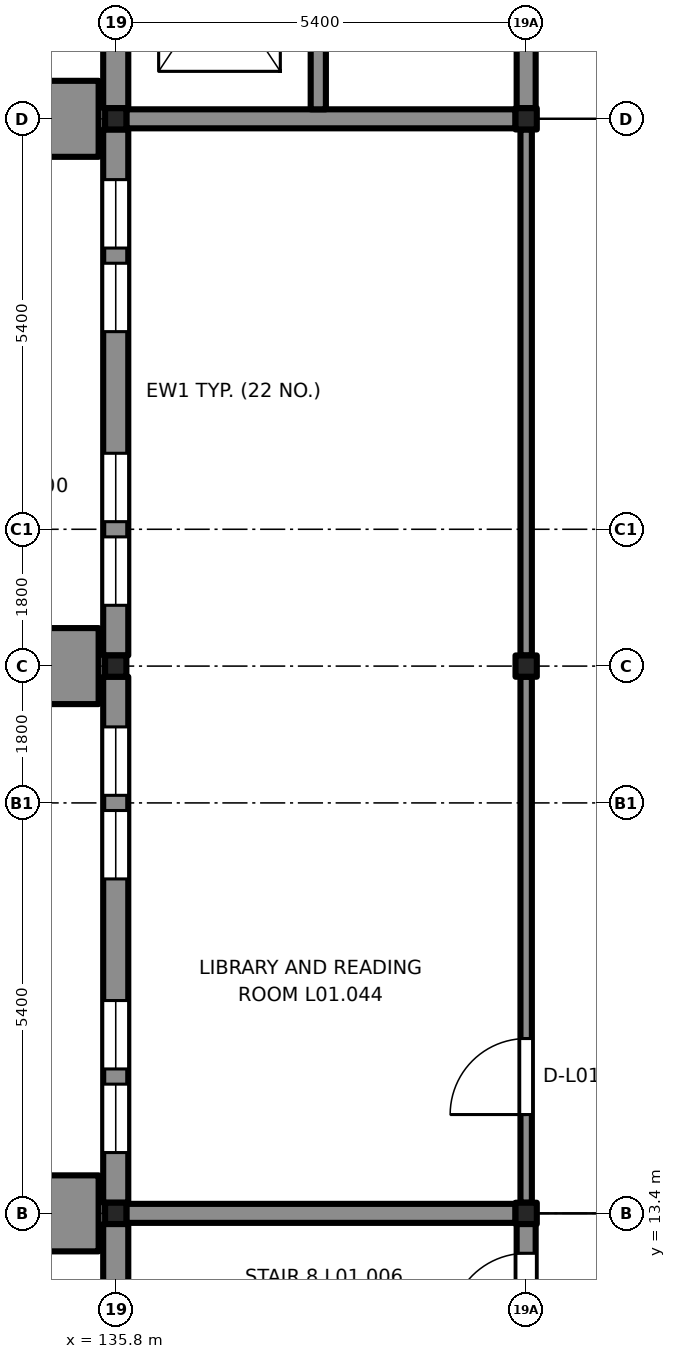
"""IFC4 building model, lengths in metres.
Left out: names, types, materials, properties, quantities, classifications, styles, units other than length and angle.
Written with IfcOpenShell. Run it as: python <this file> out.ifc"""

import sys

from ifc_helpers import new_model, si_unit, direction, frame, frame_2d, origin, origin_2d, place, context, subcontext, project, spatial, rectangle, extrude, element, fill, save


model = new_model("IFC4")
c1 = context("Model", 3, precision=1e-05, world=origin(), true_north=direction((0.0, 1.0)))
c2 = subcontext(c1, "Body", "Model", "MODEL_VIEW")
j1 = project(units=[si_unit("LENGTHUNIT", "METRE"), si_unit("PLANEANGLEUNIT", "RADIAN")], contexts=[c1])
p1 = place(None, origin())
s1 = spatial("IfcSite", under=j1, at=p1, CompositionType="ELEMENT")
p2 = place(p1, origin())
s2 = spatial("IfcBuilding", under=s1, at=p2, CompositionType="ELEMENT")
p3 = place(p2, frame((0.0, 0.0, 6.3)))
s3 = spatial("IfcBuildingStorey", under=s2, at=p3, CompositionType="ELEMENT", Elevation=6.3)
for number, where, z_axis, x_axis in (
    (1, (135.8, 13.4, 0.0), (0.0, 0.0, 1.0), (1.0, 0.0, 0.0)),
    (2, (141.2, 13.4, 0.0), (0.0, 0.0, 1.0), (1.0, 0.0, 0.0)),
    (3, (135.8, 20.6, 0.0), (0.0, 0.0, 1.0), (1.0, 0.0, 0.0)),
    (4, (141.2, 20.6, 0.0), (0.0, 0.0, 1.0), (1.0, 0.0, 0.0)),
    (5, (135.8, 27.8, 0.0), (0.0, 0.0, 1.0), (1.0, 0.0, 0.0)),
    (6, (141.2, 27.8, 0.0), (0.0, 0.0, 1.0), (1.0, 0.0, 0.0)),
):
    element("IfcColumn", number, at=place(p3, frame(where, z_axis=z_axis, x_axis=x_axis)), inside=s3, PredefinedType="COLUMN", context=c2, shape_type="SweptSolid", body=[
        extrude(rectangle(XDim=0.28, YDim=0.28, at=origin_2d()), origin(), (0.0, 0.0, 1.0), 3.9),
    ])
p4 = place(p3, frame((141.2, 6.365, 0.0), z_axis=(0.0, 0.0, 1.0), x_axis=(0.0, 1.0, 0.0)))
e7 = element("IfcWall", 7, at=p4, inside=s3, PredefinedType="SHEAR", context=c2, shape_type="SweptSolid", body=[
    extrude(rectangle(XDim=6.895, YDim=0.25, at=frame_2d((3.448, 0.0))), origin(), (0.0, 0.0, 1.0), 3.65),
])
p5 = place(p4, frame((5.51, 0.0, 0.0)))
e8 = element("IfcOpeningElement", 8, at=p5, cuts=e7, PredefinedType="OPENING", context=c2, shape_type="SweptSolid", body=[
    extrude(rectangle(XDim=1.0, YDim=2.1, at=frame_2d((0.5, 1.05))), frame((0.0, 0.135, 0.0), z_axis=(0.0, -1.0, 0.0), x_axis=(1.0, 0.0, 0.0)), (0.0, 0.0, 1.0), 0.27),
])
p6 = place(p3, frame((135.94, 13.4, 0.0), z_axis=(0.0, 0.0, 1.0), x_axis=(1.0, 0.0, 0.0)))
e9 = element("IfcWall", 9, at=p6, inside=s3, PredefinedType="SHEAR", context=c2, shape_type="SweptSolid", body=[
    extrude(rectangle(XDim=5.12, YDim=0.25, at=frame_2d((2.56, 0.0))), origin(), (0.0, 0.0, 1.0), 3.65),
])
p7 = place(p3, frame((141.2, 27.94, 0.0), z_axis=(0.0, 0.0, 1.0), x_axis=(0.0, 1.0, 0.0)))
e10 = element("IfcWall", 10, at=p7, inside=s3, PredefinedType="SHEAR", context=c2, shape_type="SweptSolid", body=[
    extrude(rectangle(XDim=6.92, YDim=0.25, at=frame_2d((3.46, 0.0))), origin(), (0.0, 0.0, 1.0), 3.65),
])
p8 = place(p7, frame((4.16, 0.0, 0.0)))
e11 = element("IfcOpeningElement", 11, at=p8, cuts=e10, PredefinedType="OPENING", context=c2, shape_type="SweptSolid", body=[
    extrude(rectangle(XDim=1.8, YDim=2.1, at=frame_2d((0.9, 1.05))), frame((0.0, 0.135, 0.0), z_axis=(0.0, -1.0, 0.0), x_axis=(1.0, 0.0, 0.0)), (0.0, 0.0, 1.0), 0.27),
])
p9 = place(p3, frame((135.94, 27.8, 0.0), z_axis=(0.0, 0.0, 1.0), x_axis=(1.0, 0.0, 0.0)))
e12 = element("IfcWall", 12, at=p9, inside=s3, PredefinedType="SHEAR", context=c2, shape_type="SweptSolid", body=[
    extrude(rectangle(XDim=5.12, YDim=0.25, at=frame_2d((2.56, 0.0))), origin(), (0.0, 0.0, 1.0), 3.65),
])
p10 = place(p3, frame((138.465, 27.925, 0.0), z_axis=(0.0, 0.0, 1.0), x_axis=(0.0, 1.0, 0.0)))
e13 = element("IfcWall", 13, at=p10, inside=s3, PredefinedType="SHEAR", context=c2, shape_type="SweptSolid", body=[
    extrude(rectangle(XDim=3.0, YDim=0.2, at=frame_2d((1.5, 0.0))), origin(), (0.0, 0.0, 1.0), 3.65),
])
p11 = place(p3, frame((135.8, 10.5, 0.0), z_axis=(0.0, 0.0, 1.0), x_axis=(0.0, 1.0, 0.0)))
e14 = element("IfcWall", 14, at=p11, inside=s3, PredefinedType="SOLIDWALL", context=c2, shape_type="SweptSolid", body=[
    extrude(rectangle(XDim=2.76, YDim=0.33, at=frame_2d((1.38, 0.0))), origin(), (0.0, 0.0, 1.0), 3.22),
])
p12 = place(p3, frame((135.8, 13.54, 0.0), z_axis=(0.0, 0.0, 1.0), x_axis=(0.0, 1.0, 0.0)))
e15 = element("IfcWall", 15, at=p12, inside=s3, PredefinedType="SOLIDWALL", context=c2, shape_type="SweptSolid", body=[
    extrude(rectangle(XDim=6.92, YDim=0.33, at=frame_2d((3.46, 0.0))), origin(), (0.0, 0.0, 1.0), 3.22),
])
p13 = place(p12, frame((0.66, 0.0, 0.6)))
e16 = element("IfcOpeningElement", 16, at=p13, cuts=e15, PredefinedType="OPENING", context=c2, shape_type="SweptSolid", body=[
    extrude(rectangle(XDim=0.9, YDim=2.4, at=frame_2d((0.45, 1.2))), frame((0.0, 0.175, 0.0), z_axis=(0.0, -1.0, 0.0), x_axis=(1.0, 0.0, 0.0)), (0.0, 0.0, 1.0), 0.35),
])
p14 = place(p12, frame((1.76, 0.0, 0.6)))
e17 = element("IfcOpeningElement", 17, at=p14, cuts=e15, PredefinedType="OPENING", context=c2, shape_type="SweptSolid", body=[
    extrude(rectangle(XDim=0.9, YDim=2.4, at=frame_2d((0.45, 1.2))), frame((0.0, 0.175, 0.0), z_axis=(0.0, -1.0, 0.0), x_axis=(1.0, 0.0, 0.0)), (0.0, 0.0, 1.0), 0.35),
])
p15 = place(p12, frame((4.26, 0.0, 0.6)))
e18 = element("IfcOpeningElement", 18, at=p15, cuts=e15, PredefinedType="OPENING", context=c2, shape_type="SweptSolid", body=[
    extrude(rectangle(XDim=0.9, YDim=2.4, at=frame_2d((0.45, 1.2))), frame((0.0, 0.175, 0.0), z_axis=(0.0, -1.0, 0.0), x_axis=(1.0, 0.0, 0.0)), (0.0, 0.0, 1.0), 0.35),
])
p16 = place(p12, frame((5.36, 0.0, 0.6)))
e19 = element("IfcOpeningElement", 19, at=p16, cuts=e15, PredefinedType="OPENING", context=c2, shape_type="SweptSolid", body=[
    extrude(rectangle(XDim=0.9, YDim=2.4, at=frame_2d((0.45, 1.2))), frame((0.0, 0.175, 0.0), z_axis=(0.0, -1.0, 0.0), x_axis=(1.0, 0.0, 0.0)), (0.0, 0.0, 1.0), 0.35),
])
p17 = place(p3, frame((135.8, 20.74, 0.0), z_axis=(0.0, 0.0, 1.0), x_axis=(0.0, 1.0, 0.0)))
e20 = element("IfcWall", 20, at=p17, inside=s3, PredefinedType="SOLIDWALL", context=c2, shape_type="SweptSolid", body=[
    extrude(rectangle(XDim=6.92, YDim=0.33, at=frame_2d((3.46, 0.0))), origin(), (0.0, 0.0, 1.0), 3.22),
])
p18 = place(p17, frame((0.66, 0.0, 0.6)))
e21 = element("IfcOpeningElement", 21, at=p18, cuts=e20, PredefinedType="OPENING", context=c2, shape_type="SweptSolid", body=[
    extrude(rectangle(XDim=0.9, YDim=2.4, at=frame_2d((0.45, 1.2))), frame((0.0, 0.175, 0.0), z_axis=(0.0, -1.0, 0.0), x_axis=(1.0, 0.0, 0.0)), (0.0, 0.0, 1.0), 0.35),
])
p19 = place(p17, frame((1.76, 0.0, 0.6)))
e22 = element("IfcOpeningElement", 22, at=p19, cuts=e20, PredefinedType="OPENING", context=c2, shape_type="SweptSolid", body=[
    extrude(rectangle(XDim=0.9, YDim=2.4, at=frame_2d((0.45, 1.2))), frame((0.0, 0.175, 0.0), z_axis=(0.0, -1.0, 0.0), x_axis=(1.0, 0.0, 0.0)), (0.0, 0.0, 1.0), 0.35),
])
p20 = place(p17, frame((4.26, 0.0, 0.6)))
e23 = element("IfcOpeningElement", 23, at=p20, cuts=e20, PredefinedType="OPENING", context=c2, shape_type="SweptSolid", body=[
    extrude(rectangle(XDim=0.9, YDim=2.4, at=frame_2d((0.45, 1.2))), frame((0.0, 0.175, 0.0), z_axis=(0.0, -1.0, 0.0), x_axis=(1.0, 0.0, 0.0)), (0.0, 0.0, 1.0), 0.35),
])
p21 = place(p17, frame((5.36, 0.0, 0.6)))
e24 = element("IfcOpeningElement", 24, at=p21, cuts=e20, PredefinedType="OPENING", context=c2, shape_type="SweptSolid", body=[
    extrude(rectangle(XDim=0.9, YDim=2.4, at=frame_2d((0.45, 1.2))), frame((0.0, 0.175, 0.0), z_axis=(0.0, -1.0, 0.0), x_axis=(1.0, 0.0, 0.0)), (0.0, 0.0, 1.0), 0.35),
])
p22 = place(p3, frame((135.8, 27.94, 0.0), z_axis=(0.0, 0.0, 1.0), x_axis=(0.0, 1.0, 0.0)))
e25 = element("IfcWall", 25, at=p22, inside=s3, PredefinedType="SOLIDWALL", context=c2, shape_type="SweptSolid", body=[
    extrude(rectangle(XDim=6.92, YDim=0.33, at=frame_2d((3.46, 0.0))), origin(), (0.0, 0.0, 1.0), 3.22),
])
for number, where, z_axis, x_axis in (
    (26, (135.2, 12.9, 0.0), (0.0, 0.0, 1.0), (0.0, 1.0, 0.0)),
    (27, (135.2, 20.1, 0.0), (0.0, 0.0, 1.0), (0.0, 1.0, 0.0)),
    (28, (135.2, 27.3, 0.0), (0.0, 0.0, 1.0), (0.0, 1.0, 0.0)),
):
    element("IfcWall", number, at=place(p3, frame(where, z_axis=z_axis, x_axis=x_axis)), inside=s3, PredefinedType="SOLIDWALL", context=c2, shape_type="SweptSolid", body=[
        extrude(rectangle(XDim=1.0, YDim=0.75, at=frame_2d((0.5, 0.0))), origin(), (0.0, 0.0, 1.0), 3.9),
    ])
p23 = place(p3, frame((141.2, 13.54, 0.0), z_axis=(0.0, 0.0, 1.0), x_axis=(0.0, 1.0, 0.0)))
e29 = element("IfcWall", 29, at=p23, inside=s3, PredefinedType="PARTITIONING", context=c2, shape_type="SweptSolid", body=[
    extrude(rectangle(XDim=6.92, YDim=0.15, at=frame_2d((3.46, 0.0))), origin(), (0.0, 0.0, 1.0), 3.22),
])
p24 = place(p23, frame((1.16, 0.0, 0.0)))
e30 = element("IfcOpeningElement", 30, at=p24, cuts=e29, PredefinedType="OPENING", context=c2, shape_type="SweptSolid", body=[
    extrude(rectangle(XDim=1.0, YDim=2.1, at=frame_2d((0.5, 1.05))), frame((0.0, 0.085, 0.0), z_axis=(0.0, -1.0, 0.0), x_axis=(1.0, 0.0, 0.0)), (0.0, 0.0, 1.0), 0.17),
])
p25 = place(p3, frame((141.2, 20.74, 0.0), z_axis=(0.0, 0.0, 1.0), x_axis=(0.0, 1.0, 0.0)))
e31 = element("IfcWall", 31, at=p25, inside=s3, PredefinedType="PARTITIONING", context=c2, shape_type="SweptSolid", body=[
    extrude(rectangle(XDim=6.92, YDim=0.15, at=frame_2d((3.46, 0.0))), origin(), (0.0, 0.0, 1.0), 3.22),
])
p26 = place(p5, origin())
e32 = element("IfcDoor", 32, at=p26, inside=s3, OperationType="SINGLE_SWING_RIGHT", PredefinedType="DOOR", context=c2, shape_type="SweptSolid", body=[
    extrude(rectangle(XDim=1.0, YDim=2.1, at=frame_2d((0.5, 1.05))), frame((0.0, 0.025, 0.0), z_axis=(0.0, -1.0, 0.0), x_axis=(1.0, 0.0, 0.0)), (0.0, 0.0, 1.0), 0.05),
])
fill(e8, e32)
p27 = place(p13, origin())
e33 = element("IfcWindow", 33, at=p27, inside=s3, PartitioningType="SINGLE_PANEL", PredefinedType="WINDOW", context=c2, shape_type="SweptSolid", body=[
    extrude(rectangle(XDim=0.9, YDim=2.4, at=frame_2d((0.45, 1.2))), frame((0.0, -0.03, 0.0), z_axis=(0.0, -1.0, 0.0), x_axis=(1.0, 0.0, 0.0)), (0.0, 0.0, 1.0), 0.06),
])
fill(e16, e33)
p28 = place(p14, origin())
e34 = element("IfcWindow", 34, at=p28, inside=s3, PartitioningType="SINGLE_PANEL", PredefinedType="WINDOW", context=c2, shape_type="SweptSolid", body=[
    extrude(rectangle(XDim=0.9, YDim=2.4, at=frame_2d((0.45, 1.2))), frame((0.0, -0.03, 0.0), z_axis=(0.0, -1.0, 0.0), x_axis=(1.0, 0.0, 0.0)), (0.0, 0.0, 1.0), 0.06),
])
fill(e17, e34)
p29 = place(p15, origin())
e35 = element("IfcWindow", 35, at=p29, inside=s3, PartitioningType="SINGLE_PANEL", PredefinedType="WINDOW", context=c2, shape_type="SweptSolid", body=[
    extrude(rectangle(XDim=0.9, YDim=2.4, at=frame_2d((0.45, 1.2))), frame((0.0, -0.03, 0.0), z_axis=(0.0, -1.0, 0.0), x_axis=(1.0, 0.0, 0.0)), (0.0, 0.0, 1.0), 0.06),
])
fill(e18, e35)
p30 = place(p16, origin())
e36 = element("IfcWindow", 36, at=p30, inside=s3, PartitioningType="SINGLE_PANEL", PredefinedType="WINDOW", context=c2, shape_type="SweptSolid", body=[
    extrude(rectangle(XDim=0.9, YDim=2.4, at=frame_2d((0.45, 1.2))), frame((0.0, -0.03, 0.0), z_axis=(0.0, -1.0, 0.0), x_axis=(1.0, 0.0, 0.0)), (0.0, 0.0, 1.0), 0.06),
])
fill(e19, e36)
p31 = place(p18, origin())
e37 = element("IfcWindow", 37, at=p31, inside=s3, PartitioningType="SINGLE_PANEL", PredefinedType="WINDOW", context=c2, shape_type="SweptSolid", body=[
    extrude(rectangle(XDim=0.9, YDim=2.4, at=frame_2d((0.45, 1.2))), frame((0.0, -0.03, 0.0), z_axis=(0.0, -1.0, 0.0), x_axis=(1.0, 0.0, 0.0)), (0.0, 0.0, 1.0), 0.06),
])
fill(e21, e37)
p32 = place(p19, origin())
e38 = element("IfcWindow", 38, at=p32, inside=s3, PartitioningType="SINGLE_PANEL", PredefinedType="WINDOW", context=c2, shape_type="SweptSolid", body=[
    extrude(rectangle(XDim=0.9, YDim=2.4, at=frame_2d((0.45, 1.2))), frame((0.0, -0.03, 0.0), z_axis=(0.0, -1.0, 0.0), x_axis=(1.0, 0.0, 0.0)), (0.0, 0.0, 1.0), 0.06),
])
fill(e22, e38)
p33 = place(p20, origin())
e39 = element("IfcWindow", 39, at=p33, inside=s3, PartitioningType="SINGLE_PANEL", PredefinedType="WINDOW", context=c2, shape_type="SweptSolid", body=[
    extrude(rectangle(XDim=0.9, YDim=2.4, at=frame_2d((0.45, 1.2))), frame((0.0, -0.03, 0.0), z_axis=(0.0, -1.0, 0.0), x_axis=(1.0, 0.0, 0.0)), (0.0, 0.0, 1.0), 0.06),
])
fill(e23, e39)
p34 = place(p21, origin())
e40 = element("IfcWindow", 40, at=p34, inside=s3, PartitioningType="SINGLE_PANEL", PredefinedType="WINDOW", context=c2, shape_type="SweptSolid", body=[
    extrude(rectangle(XDim=0.9, YDim=2.4, at=frame_2d((0.45, 1.2))), frame((0.0, -0.03, 0.0), z_axis=(0.0, -1.0, 0.0), x_axis=(1.0, 0.0, 0.0)), (0.0, 0.0, 1.0), 0.06),
])
fill(e24, e40)
p35 = place(p24, origin())
e41 = element("IfcDoor", 41, at=p35, inside=s3, OperationType="SINGLE_SWING_LEFT", PredefinedType="DOOR", context=c2, shape_type="SweptSolid", body=[
    extrude(rectangle(XDim=1.0, YDim=2.1, at=frame_2d((0.5, 1.05))), frame((0.0, 0.025, 0.0), z_axis=(0.0, -1.0, 0.0), x_axis=(1.0, 0.0, 0.0)), (0.0, 0.0, 1.0), 0.05),
])
fill(e30, e41)
save(model, sys.argv[1])
